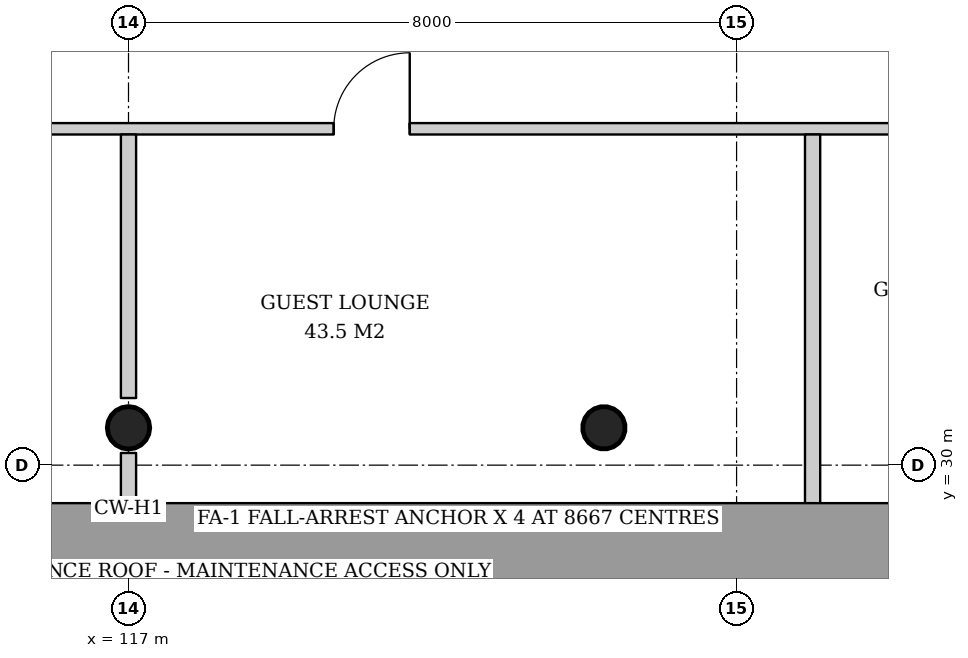
"""IFC4 building model, lengths in metres.
Left out: names, types, materials, properties, quantities, classifications, styles, units other than length and angle.
Written with IfcOpenShell. Run it as: python <this file> out.ifc"""

import sys

from ifc_helpers import new_model, si_unit, direction, frame, frame_2d, origin, origin_2d, place, context, subcontext, project, spatial, rectangle, hollow_circle, extrude, element, fill, save


model = new_model("IFC4")
c1 = context("Model", 3, precision=1e-05, world=origin(), true_north=direction((0.0, 1.0)))
c2 = subcontext(c1, "Body", "Model", "MODEL_VIEW")
j1 = project(units=[si_unit("LENGTHUNIT", "METRE"), si_unit("PLANEANGLEUNIT", "RADIAN")], contexts=[c1])
p1 = place(None, origin())
s1 = spatial("IfcSite", under=j1, at=p1, CompositionType="ELEMENT")
p2 = place(p1, origin())
s2 = spatial("IfcBuilding", under=s1, at=p2, CompositionType="ELEMENT")
p3 = place(p2, frame((0.0, 0.0, 100.8)))
s3 = spatial("IfcBuildingStorey", under=s2, at=p3, CompositionType="ELEMENT", Elevation=100.8)
p4 = place(p3, frame((117.0, 30.44, 0.0), z_axis=(0.0, 0.043069538298, 0.999072076915), x_axis=(-1.0, 0.0, 0.0)))
e1 = element("IfcColumn", 1, at=p4, inside=s3, PredefinedType="COLUMN", context=c2, shape_type="SweptSolid", body=[
    extrude(hollow_circle(Radius=0.28, WallThickness=0.02, at=origin_2d()), origin(), (0.0, 0.0, 1.0), 3.803),
])
p5 = place(p3, frame((123.28, 30.44, 0.0), z_axis=(-0.021561848751, 0.043059525333, 0.998839808957), x_axis=(-0.894160516368, -0.44774654769, 0.0)))
e2 = element("IfcColumn", 2, at=p5, inside=s3, PredefinedType="COLUMN", context=c2, shape_type="SweptSolid", body=[
    extrude(hollow_circle(Radius=0.28, WallThickness=0.02, at=origin_2d()), origin(), (0.0, 0.0, 1.0), 3.804),
])
p6 = place(p3, frame((105.564, 34.425, 0.0), z_axis=(0.0, 0.0, 1.0), x_axis=(1.0, 0.0, 0.0)))
e3 = element("IfcWall", 3, at=p6, inside=s3, PredefinedType="PARTITIONING", context=c2, shape_type="SweptSolid", body=[
    extrude(rectangle(XDim=22.872, YDim=0.15, at=frame_2d((11.436, 0.0))), origin(), (0.0, 0.0, 1.0), 2.9),
])
p7 = place(p6, frame((0.686, 0.0, 0.0)))
e4 = element("IfcOpeningElement", 4, at=p7, cuts=e3, PredefinedType="OPENING", context=c2, shape_type="SweptSolid", body=[
    extrude(rectangle(XDim=0.9, YDim=2.1, at=frame_2d((0.45, 1.05))), frame((0.0, 0.085, 0.0), z_axis=(0.0, -1.0, 0.0), x_axis=(1.0, 0.0, 0.0)), (0.0, 0.0, 1.0), 0.17),
])
p8 = place(p6, frame((5.186, 0.0, 0.0)))
e5 = element("IfcOpeningElement", 5, at=p8, cuts=e3, PredefinedType="OPENING", context=c2, shape_type="SweptSolid", body=[
    extrude(rectangle(XDim=0.9, YDim=2.1, at=frame_2d((0.45, 1.05))), frame((0.0, 0.085, 0.0), z_axis=(0.0, -1.0, 0.0), x_axis=(1.0, 0.0, 0.0)), (0.0, 0.0, 1.0), 0.17),
])
p9 = place(p6, frame((14.136, 0.0, 0.0)))
e6 = element("IfcOpeningElement", 6, at=p9, cuts=e3, PredefinedType="OPENING", context=c2, shape_type="SweptSolid", body=[
    extrude(rectangle(XDim=1.0, YDim=2.1, at=frame_2d((0.5, 1.05))), frame((0.0, 0.085, 0.0), z_axis=(0.0, -1.0, 0.0), x_axis=(1.0, 0.0, 0.0)), (0.0, 0.0, 1.0), 0.17),
])
p10 = place(p3, frame((117.0, 34.35, 0.0), z_axis=(0.0, 0.0, 1.0), x_axis=(0.0, -1.0, 0.0)))
e7 = element("IfcWall", 7, at=p10, inside=s3, PredefinedType="PARTITIONING", context=c2, shape_type="SweptSolid", body=[
    extrude(rectangle(XDim=3.467, YDim=0.2, at=frame_2d((1.733, 0.0))), origin(), (0.0, 0.0, 1.0), 3.6),
])
p11 = place(p3, frame((117.0, 30.16, 0.0), z_axis=(0.0, 0.0, 1.0), x_axis=(0.0, -1.0, 0.0)))
e8 = element("IfcWall", 8, at=p11, inside=s3, PredefinedType="PARTITIONING", context=c2, shape_type="SweptSolid", body=[
    extrude(rectangle(XDim=0.7, YDim=0.2, at=frame_2d((0.35, 0.0))), origin(), (0.0, 0.0, 1.0), 3.6),
])
p12 = place(p3, frame((126.0, 34.35, 0.0), z_axis=(0.0, 0.0, 1.0), x_axis=(0.0, -1.0, 0.0)))
e9 = element("IfcWall", 9, at=p12, inside=s3, PredefinedType="PARTITIONING", context=c2, shape_type="SweptSolid", body=[
    extrude(rectangle(XDim=4.89, YDim=0.2, at=frame_2d((2.445, 0.0))), origin(), (0.0, 0.0, 1.0), 3.2),
])
p13 = place(p9, origin())
e10 = element("IfcDoor", 10, at=p13, inside=s3, OperationType="SINGLE_SWING_RIGHT", PredefinedType="DOOR", context=c2, shape_type="SweptSolid", body=[
    extrude(rectangle(XDim=1.0, YDim=2.1, at=frame_2d((0.5, 1.05))), frame((0.0, 0.025, 0.0), z_axis=(0.0, -1.0, 0.0), x_axis=(1.0, 0.0, 0.0)), (0.0, 0.0, 1.0), 0.05),
])
fill(e6, e10)
save(model, sys.argv[1])
